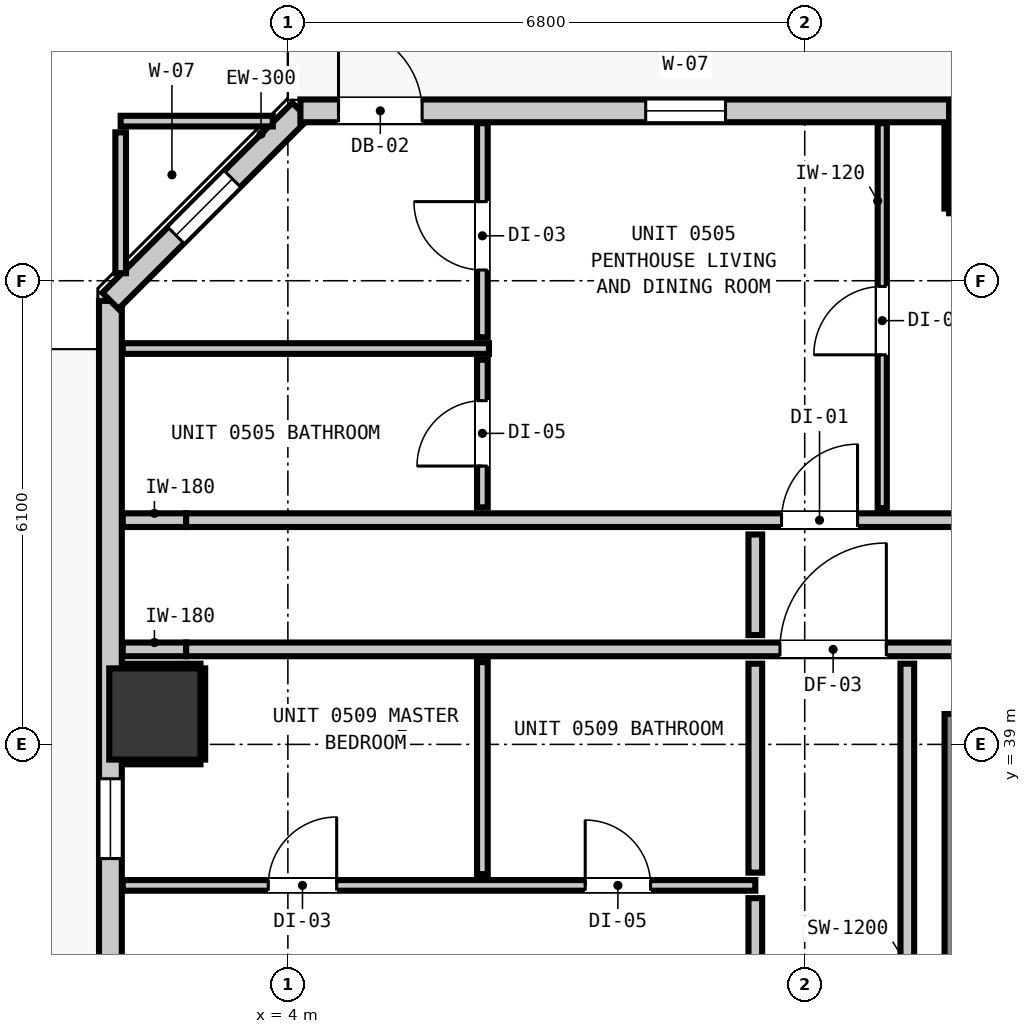
"""IFC4 building model, lengths in metres.
Left out: names, types, materials, properties, quantities, classifications, styles, units other than length and angle.
Written with IfcOpenShell. Run it as: python <this file> out.ifc"""

import sys

from ifc_helpers import new_model, si_unit, direction, frame, frame_2d, origin, origin_2d, place, context, subcontext, project, spatial, rectangle, extrude, element, fill, save


model = new_model("IFC4")
c1 = context("Model", 3, precision=1e-05, world=origin(), true_north=direction((0.0, 1.0)))
c2 = subcontext(c1, "Body", "Model", "MODEL_VIEW")
j1 = project(units=[si_unit("LENGTHUNIT", "METRE"), si_unit("PLANEANGLEUNIT", "RADIAN")], contexts=[c1])
p1 = place(None, origin())
s1 = spatial("IfcSite", under=j1, at=p1, CompositionType="ELEMENT")
p2 = place(p1, origin())
s2 = spatial("IfcBuilding", under=s1, at=p2, CompositionType="ELEMENT")
p3 = place(p2, frame((0.0, 0.0, 22.0)))
s3 = spatial("IfcBuildingStorey", under=s2, at=p3, CompositionType="ELEMENT", Elevation=22.0)
p4 = place(p3, frame((13.24, 31.205, 0.0), z_axis=(0.0, 0.0, 1.0), x_axis=(0.0, 1.0, 0.0)))
e1 = element("IfcWall", 1, at=p4, inside=s3, PredefinedType="SHEAR", context=c2, shape_type="SweptSolid", body=[
    extrude(rectangle(XDim=8.195, YDim=1.2, at=frame_2d((4.097, 0.0))), origin(), (0.0, 0.0, 1.0), 3.32),
])
p5 = place(p3, frame((13.4, 46.75, -0.2), z_axis=(0.0, 0.0, 1.0), x_axis=(1.0, 0.0, 0.0)))
e2 = element("IfcColumn", 2, at=p5, inside=s3, PredefinedType="COLUMN", context=c2, shape_type="SweptSolid", body=[
    extrude(rectangle(XDim=1.4, YDim=1.4, at=origin_2d()), origin(), (0.0, 0.0, 1.0), 3.52),
])
p6 = place(p3, frame((2.25, 39.4, -0.2), z_axis=(0.0, 0.0, 1.0), x_axis=(1.0, 0.0, 0.0)))
e3 = element("IfcColumn", 3, at=p6, inside=s3, PredefinedType="COLUMN", context=c2, shape_type="SweptSolid", body=[
    extrude(rectangle(XDim=1.2, YDim=1.2, at=origin_2d()), origin(), (0.0, 0.0, 1.0), 3.52),
])
p7 = place(p3, frame((1.665, 10.165, 0.0), z_axis=(0.0, 0.0, 1.0), x_axis=(0.0, 1.0, 0.0)))
e4 = element("IfcWall", 4, at=p7, inside=s3, PredefinedType="STANDARD", context=c2, shape_type="SweptSolid", body=[
    extrude(rectangle(XDim=34.67, YDim=0.3, at=frame_2d((17.335, 0.0))), origin(), (0.0, 0.0, 1.0), 3.06),
])
p8 = place(p7, frame((3.352, 0.0, 0.0)))
e5 = element("IfcOpeningElement", 5, at=p8, cuts=e4, PredefinedType="OPENING", context=c2, shape_type="SweptSolid", body=[
    extrude(rectangle(XDim=1.0, YDim=2.15, at=frame_2d((0.5, 1.075))), frame((0.0, 0.16, 0.0), z_axis=(0.0, -1.0, 0.0), x_axis=(1.0, 0.0, 0.0)), (0.0, 0.0, 1.0), 0.32),
])
p9 = place(p7, frame((14.748, 0.0, 0.85)))
e6 = element("IfcOpeningElement", 6, at=p9, cuts=e4, PredefinedType="OPENING", context=c2, shape_type="SweptSolid", body=[
    extrude(rectangle(XDim=1.05, YDim=1.65, at=frame_2d((0.525, 0.825))), frame((0.0, 0.16, 0.0), z_axis=(0.0, -1.0, 0.0), x_axis=(1.0, 0.0, 0.0)), (0.0, 0.0, 1.0), 0.32),
])
p10 = place(p7, frame((17.898, 0.0, 0.85)))
e7 = element("IfcOpeningElement", 7, at=p10, cuts=e4, PredefinedType="OPENING", context=c2, shape_type="SweptSolid", body=[
    extrude(rectangle(XDim=1.05, YDim=1.65, at=frame_2d((0.525, 0.825))), frame((0.0, 0.16, 0.0), z_axis=(0.0, -1.0, 0.0), x_axis=(1.0, 0.0, 0.0)), (0.0, 0.0, 1.0), 0.32),
])
p11 = place(p7, frame((24.282, 0.0, 0.85)))
e8 = element("IfcOpeningElement", 8, at=p11, cuts=e4, PredefinedType="OPENING", context=c2, shape_type="SweptSolid", body=[
    extrude(rectangle(XDim=1.05, YDim=1.65, at=frame_2d((0.525, 0.825))), frame((0.0, 0.16, 0.0), z_axis=(0.0, -1.0, 0.0), x_axis=(1.0, 0.0, 0.0)), (0.0, 0.0, 1.0), 0.32),
])
p12 = place(p7, frame((27.333, 0.0, 0.85)))
e9 = element("IfcOpeningElement", 9, at=p12, cuts=e4, PredefinedType="OPENING", context=c2, shape_type="SweptSolid", body=[
    extrude(rectangle(XDim=1.05, YDim=1.65, at=frame_2d((0.525, 0.825))), frame((0.0, 0.16, 0.0), z_axis=(0.0, -1.0, 0.0), x_axis=(1.0, 0.0, 0.0)), (0.0, 0.0, 1.0), 0.32),
])
p13 = place(p3, frame((1.665, 44.835, 0.0), z_axis=(0.0, 0.0, 1.0), x_axis=(0.707106781187, 0.707106781187, 0.0)))
e10 = element("IfcWall", 10, at=p13, inside=s3, PredefinedType="STANDARD", context=c2, shape_type="SweptSolid", body=[
    extrude(rectangle(XDim=3.536, YDim=0.3, at=frame_2d((1.768, 0.0))), origin(), (0.0, 0.0, 1.0), 3.06),
])
p14 = place(p13, frame((1.22, 0.0, 0.85)))
e11 = element("IfcOpeningElement", 11, at=p14, cuts=e10, PredefinedType="OPENING", context=c2, shape_type="SweptSolid", body=[
    extrude(rectangle(XDim=1.05, YDim=1.65, at=frame_2d((0.525, 0.825))), frame((0.0, 0.16, 0.0), z_axis=(0.0, -1.0, 0.0), x_axis=(1.0, 0.0, 0.0)), (0.0, 0.0, 1.0), 0.32),
])
p15 = place(p3, frame((4.165, 47.335, 0.0), z_axis=(0.0, 0.0, 1.0), x_axis=(1.0, 0.0, 0.0)))
e12 = element("IfcWall", 12, at=p15, inside=s3, PredefinedType="STANDARD", context=c2, shape_type="SweptSolid", body=[
    extrude(rectangle(XDim=37.47, YDim=0.3, at=frame_2d((18.735, 0.0))), origin(), (0.0, 0.0, 1.0), 3.06),
])
p16 = place(p15, frame((0.501, 0.0, 0.0)))
e13 = element("IfcOpeningElement", 13, at=p16, cuts=e12, PredefinedType="OPENING", context=c2, shape_type="SweptSolid", body=[
    extrude(rectangle(XDim=1.1, YDim=2.15, at=frame_2d((0.55, 1.075))), frame((0.0, 0.16, 0.0), z_axis=(0.0, -1.0, 0.0), x_axis=(1.0, 0.0, 0.0)), (0.0, 0.0, 1.0), 0.32),
])
p17 = place(p15, frame((4.543, 0.0, 0.85)))
e14 = element("IfcOpeningElement", 14, at=p17, cuts=e12, PredefinedType="OPENING", context=c2, shape_type="SweptSolid", body=[
    extrude(rectangle(XDim=1.05, YDim=1.65, at=frame_2d((0.525, 0.825))), frame((0.0, 0.16, 0.0), z_axis=(0.0, -1.0, 0.0), x_axis=(1.0, 0.0, 0.0)), (0.0, 0.0, 1.0), 0.32),
])
p18 = place(p15, frame((13.746, 0.0, 0.85)))
e15 = element("IfcOpeningElement", 15, at=p18, cuts=e12, PredefinedType="OPENING", context=c2, shape_type="SweptSolid", body=[
    extrude(rectangle(XDim=1.05, YDim=1.65, at=frame_2d((0.525, 0.825))), frame((0.0, 0.16, 0.0), z_axis=(0.0, -1.0, 0.0), x_axis=(1.0, 0.0, 0.0)), (0.0, 0.0, 1.0), 0.32),
])
p19 = place(p15, frame((29.575, 0.0, 0.85)))
e16 = element("IfcOpeningElement", 16, at=p19, cuts=e12, PredefinedType="OPENING", context=c2, shape_type="SweptSolid", body=[
    extrude(rectangle(XDim=1.05, YDim=1.65, at=frame_2d((0.525, 0.825))), frame((0.0, 0.16, 0.0), z_axis=(0.0, -1.0, 0.0), x_axis=(1.0, 0.0, 0.0)), (0.0, 0.0, 1.0), 0.32),
])
p20 = place(p15, frame((26.524, 0.0, 0.85)))
e17 = element("IfcOpeningElement", 17, at=p20, cuts=e12, PredefinedType="OPENING", context=c2, shape_type="SweptSolid", body=[
    extrude(rectangle(XDim=1.05, YDim=1.65, at=frame_2d((0.525, 0.825))), frame((0.0, 0.16, 0.0), z_axis=(0.0, -1.0, 0.0), x_axis=(1.0, 0.0, 0.0)), (0.0, 0.0, 1.0), 0.32),
])
p21 = place(p3, frame((1.827, 40.25, 0.0), z_axis=(0.0, 0.0, 1.0), x_axis=(1.0, 0.0, 0.0)))
e18 = element("IfcWall", 18, at=p21, inside=s3, PredefinedType="PARTITIONING", context=c2, shape_type="SweptSolid", body=[
    extrude(rectangle(XDim=0.834, YDim=0.18, at=frame_2d((0.417, 0.0))), origin(), (0.0, 0.0, 1.0), 3.06),
])
p22 = place(p3, frame((2.661, 40.25, 0.0), z_axis=(0.0, 0.0, 1.0), x_axis=(1.0, 0.0, 0.0)))
e19 = element("IfcWall", 19, at=p22, inside=s3, PredefinedType="PARTITIONING", context=c2, shape_type="SweptSolid", body=[
    extrude(rectangle(XDim=10.328, YDim=0.18, at=frame_2d((5.164, 0.0))), origin(), (0.0, 0.0, 1.0), 2.445),
])
p23 = place(p22, frame((7.813, 0.0, 0.0)))
e20 = element("IfcOpeningElement", 20, at=p23, cuts=e19, PredefinedType="OPENING", context=c2, shape_type="SweptSolid", body=[
    extrude(rectangle(XDim=1.4, YDim=2.15, at=frame_2d((0.7, 1.075))), frame((0.0, 0.1, 0.0), z_axis=(0.0, -1.0, 0.0), x_axis=(1.0, 0.0, 0.0)), (0.0, 0.0, 1.0), 0.2),
])
p24 = place(p3, frame((1.827, 41.95, 0.0), z_axis=(0.0, 0.0, 1.0), x_axis=(1.0, 0.0, 0.0)))
e21 = element("IfcWall", 21, at=p24, inside=s3, PredefinedType="PARTITIONING", context=c2, shape_type="SweptSolid", body=[
    extrude(rectangle(XDim=0.834, YDim=0.18, at=frame_2d((0.417, 0.0))), origin(), (0.0, 0.0, 1.0), 3.06),
])
p25 = place(p3, frame((2.661, 41.95, 0.0), z_axis=(0.0, 0.0, 1.0), x_axis=(1.0, 0.0, 0.0)))
e22 = element("IfcWall", 22, at=p25, inside=s3, PredefinedType="PARTITIONING", context=c2, shape_type="SweptSolid", body=[
    extrude(rectangle(XDim=10.328, YDim=0.18, at=frame_2d((5.164, 0.0))), origin(), (0.0, 0.0, 1.0), 2.445),
])
p26 = place(p25, frame((7.834, 0.0, 0.0)))
e23 = element("IfcOpeningElement", 23, at=p26, cuts=e22, PredefinedType="OPENING", context=c2, shape_type="SweptSolid", body=[
    extrude(rectangle(XDim=1.0, YDim=2.15, at=frame_2d((0.5, 1.075))), frame((0.0, 0.1, 0.0), z_axis=(0.0, -1.0, 0.0), x_axis=(1.0, 0.0, 0.0)), (0.0, 0.0, 1.0), 0.2),
])
p27 = place(p3, frame((1.827, 37.145, 0.0), z_axis=(0.0, 0.0, 1.0), x_axis=(1.0, 0.0, 0.0)))
e24 = element("IfcWall", 24, at=p27, inside=s3, PredefinedType="PARTITIONING", context=c2, shape_type="SweptSolid", body=[
    extrude(rectangle(XDim=8.323, YDim=0.14, at=frame_2d((4.162, 0.0))), origin(), (0.0, 0.0, 1.0), 3.06),
])
p28 = place(p27, frame((6.085, 0.0, 0.0)))
e25 = element("IfcOpeningElement", 25, at=p28, cuts=e24, PredefinedType="OPENING", context=c2, shape_type="SweptSolid", body=[
    extrude(rectangle(XDim=0.86, YDim=2.02, at=frame_2d((0.43, 1.01))), frame((0.0, 0.08, 0.0), z_axis=(0.0, -1.0, 0.0), x_axis=(1.0, 0.0, 0.0)), (0.0, 0.0, 1.0), 0.16),
])
p29 = place(p27, frame((1.915, 0.0, 0.0)))
e26 = element("IfcOpeningElement", 26, at=p29, cuts=e24, PredefinedType="OPENING", context=c2, shape_type="SweptSolid", body=[
    extrude(rectangle(XDim=0.9, YDim=2.1, at=frame_2d((0.45, 1.05))), frame((0.0, 0.08, 0.0), z_axis=(0.0, -1.0, 0.0), x_axis=(1.0, 0.0, 0.0)), (0.0, 0.0, 1.0), 0.16),
])
p30 = place(p3, frame((1.827, 44.208, 0.0), z_axis=(0.0, 0.0, 1.0), x_axis=(1.0, 0.0, 0.0)))
e27 = element("IfcWall", 27, at=p30, inside=s3, PredefinedType="PARTITIONING", context=c2, shape_type="SweptSolid", body=[
    extrude(rectangle(XDim=4.819, YDim=0.14, at=frame_2d((2.41, 0.0))), origin(), (0.0, 0.0, 1.0), 3.06),
])
p31 = place(p3, frame((1.8, 47.2, 0.0), z_axis=(0.0, 0.0, 1.0), x_axis=(1.0, 0.0, 0.0)))
e28 = element("IfcWall", 28, at=p31, inside=s3, PredefinedType="PARTITIONING", context=c2, shape_type="SweptSolid", body=[
    extrude(rectangle(XDim=2.001, YDim=0.14, at=frame_2d((1.0, 0.0))), origin(), (0.0, 0.0, 1.0), 3.06),
])
p32 = place(p3, frame((10.15, 33.118, 0.0), z_axis=(0.0, 0.0, 1.0), x_axis=(0.0, 1.0, 0.0)))
e29 = element("IfcWall", 29, at=p32, inside=s3, PredefinedType="PARTITIONING", context=c2, shape_type="SweptSolid", body=[
    extrude(rectangle(XDim=3.859, YDim=0.18, at=frame_2d((1.93, 0.0))), origin(), (0.0, 0.0, 1.0), 3.06),
])
p33 = place(p32, frame((1.353, 0.0, 0.0)))
e30 = element("IfcOpeningElement", 30, at=p33, cuts=e29, PredefinedType="OPENING", context=c2, shape_type="SweptSolid", body=[
    extrude(rectangle(XDim=1.0, YDim=2.15, at=frame_2d((0.5, 1.075))), frame((0.0, 0.1, 0.0), z_axis=(0.0, -1.0, 0.0), x_axis=(1.0, 0.0, 0.0)), (0.0, 0.0, 1.0), 0.2),
])
p34 = place(p3, frame((10.15, 37.313, 0.0), z_axis=(0.0, 0.0, 1.0), x_axis=(0.0, 1.0, 0.0)))
e31 = element("IfcWall", 31, at=p34, inside=s3, PredefinedType="PARTITIONING", context=c2, shape_type="SweptSolid", body=[
    extrude(rectangle(XDim=2.749, YDim=0.18, at=frame_2d((1.375, 0.0))), origin(), (0.0, 0.0, 1.0), 3.06),
])
p35 = place(p3, frame((10.15, 40.438, 0.0), z_axis=(0.0, 0.0, 1.0), x_axis=(0.0, 1.0, 0.0)))
e32 = element("IfcWall", 32, at=p35, inside=s3, PredefinedType="PARTITIONING", context=c2, shape_type="SweptSolid", body=[
    extrude(rectangle(XDim=1.324, YDim=0.18, at=frame_2d((0.662, 0.0))), origin(), (0.0, 0.0, 1.0), 3.06),
])
p36 = place(p3, frame((12.15, 21.368, 0.0), z_axis=(0.0, 0.0, 1.0), x_axis=(0.0, 1.0, 0.0)))
e33 = element("IfcWall", 33, at=p36, inside=s3, PredefinedType="PARTITIONING", context=c2, shape_type="SweptSolid", body=[
    extrude(rectangle(XDim=18.694, YDim=0.18, at=frame_2d((9.347, 0.0))), origin(), (0.0, 0.0, 1.0), 3.06),
])
p37 = place(p3, frame((1.8, 45.199, 0.0), z_axis=(0.0, 0.0, 1.0), x_axis=(0.0, 1.0, 0.0)))
e34 = element("IfcWall", 34, at=p37, inside=s3, PredefinedType="PARTITIONING", context=c2, shape_type="SweptSolid", body=[
    extrude(rectangle(XDim=1.853, YDim=0.14, at=frame_2d((0.927, 0.0))), origin(), (0.0, 0.0, 1.0), 3.06),
])
p38 = place(p3, frame((6.559, 37.293, 0.0), z_axis=(0.0, 0.0, 1.0), x_axis=(0.0, 1.0, 0.0)))
e35 = element("IfcWall", 35, at=p38, inside=s3, PredefinedType="PARTITIONING", context=c2, shape_type="SweptSolid", body=[
    extrude(rectangle(XDim=2.789, YDim=0.14, at=frame_2d((1.395, 0.0))), origin(), (0.0, 0.0, 1.0), 3.06),
])
p39 = place(p3, frame((6.559, 42.118, 0.0), z_axis=(0.0, 0.0, 1.0), x_axis=(0.0, 1.0, 0.0)))
e36 = element("IfcWall", 36, at=p39, inside=s3, PredefinedType="PARTITIONING", context=c2, shape_type="SweptSolid", body=[
    extrude(rectangle(XDim=1.942, YDim=0.14, at=frame_2d((0.971, 0.0))), origin(), (0.0, 0.0, 1.0), 3.06),
])
p40 = place(p39, frame((0.544, 0.0, 0.0)))
e37 = element("IfcOpeningElement", 37, at=p40, cuts=e36, PredefinedType="OPENING", context=c2, shape_type="SweptSolid", body=[
    extrude(rectangle(XDim=0.86, YDim=2.02, at=frame_2d((0.43, 1.01))), frame((0.0, 0.08, 0.0), z_axis=(0.0, -1.0, 0.0), x_axis=(1.0, 0.0, 0.0)), (0.0, 0.0, 1.0), 0.16),
])
p41 = place(p3, frame((6.559, 44.356, 0.0), z_axis=(0.0, 0.0, 1.0), x_axis=(0.0, 1.0, 0.0)))
e38 = element("IfcWall", 38, at=p41, inside=s3, PredefinedType="PARTITIONING", context=c2, shape_type="SweptSolid", body=[
    extrude(rectangle(XDim=2.817, YDim=0.14, at=frame_2d((1.409, 0.0))), origin(), (0.0, 0.0, 1.0), 3.06),
])
p42 = place(p41, frame((0.885, 0.0, 0.0)))
e39 = element("IfcOpeningElement", 39, at=p42, cuts=e38, PredefinedType="OPENING", context=c2, shape_type="SweptSolid", body=[
    extrude(rectangle(XDim=0.9, YDim=2.1, at=frame_2d((0.45, 1.05))), frame((0.0, 0.08, 0.0), z_axis=(0.0, -1.0, 0.0), x_axis=(1.0, 0.0, 0.0)), (0.0, 0.0, 1.0), 0.16),
])
p43 = place(p3, frame((11.82, 42.108, 0.0), z_axis=(0.0, 0.0, 1.0), x_axis=(0.0, 1.0, 0.0)))
e40 = element("IfcWall", 40, at=p43, inside=s3, PredefinedType="PARTITIONING", context=c2, shape_type="SweptSolid", body=[
    extrude(rectangle(XDim=5.065, YDim=0.12, at=frame_2d((2.533, 0.0))), origin(), (0.0, 0.0, 1.0), 3.06),
])
p44 = place(p43, frame((2.017, 0.0, 0.0)))
e41 = element("IfcOpeningElement", 41, at=p44, cuts=e40, PredefinedType="OPENING", context=c2, shape_type="SweptSolid", body=[
    extrude(rectangle(XDim=0.9, YDim=2.1, at=frame_2d((0.45, 1.05))), frame((0.0, 0.07, 0.0), z_axis=(0.0, -1.0, 0.0), x_axis=(1.0, 0.0, 0.0)), (0.0, 0.0, 1.0), 0.14),
])
p45 = place(p3, frame((12.7, 46.018, 0.0), z_axis=(0.0, 0.0, 1.0), x_axis=(1.0, 0.0, 0.0)))
e42 = element("IfcWall", 42, at=p45, inside=s3, PredefinedType="PARTITIONING", context=c2, shape_type="SweptSolid", body=[
    extrude(rectangle(XDim=1.4, YDim=0.06, at=frame_2d((0.7, 0.0))), origin(), (0.0, 0.0, 1.0), 1.45),
])
p46 = place(p3, frame((12.668, 46.05, 0.0), z_axis=(0.0, 0.0, 1.0), x_axis=(0.0, 1.0, 0.0)))
e43 = element("IfcWall", 43, at=p46, inside=s3, PredefinedType="PARTITIONING", context=c2, shape_type="SweptSolid", body=[
    extrude(rectangle(XDim=1.12, YDim=0.06, at=frame_2d((0.56, 0.0))), origin(), (0.0, 0.0, 1.0), 1.45),
])
for number, where, z_axis, x_axis in (
    (44, (1.83, 38.768, 0.0), (0.0, 0.0, 1.0), (1.0, 0.0, 0.0)),
    (45, (1.83, 40.032, 0.0), (0.0, 0.0, 1.0), (1.0, 0.0, 0.0)),
):
    element("IfcWall", number, at=place(p3, frame(where, z_axis=z_axis, x_axis=x_axis)), inside=s3, PredefinedType="PARTITIONING", context=c2, shape_type="SweptSolid", body=[
        extrude(rectangle(XDim=1.02, YDim=0.06, at=frame_2d((0.51, 0.0))), origin(), (0.0, 0.0, 1.0), 1.45),
    ])
p47 = place(p3, frame((2.882, 38.8, 0.0), z_axis=(0.0, 0.0, 1.0), x_axis=(0.0, 1.0, 0.0)))
e46 = element("IfcWall", 46, at=p47, inside=s3, PredefinedType="PARTITIONING", context=c2, shape_type="SweptSolid", body=[
    extrude(rectangle(XDim=1.2, YDim=0.06, at=frame_2d((0.6, 0.0))), origin(), (0.0, 0.0, 1.0), 1.45),
])
p48 = place(p16, origin())
e47 = element("IfcDoor", 47, at=p48, inside=s3, OperationType="SINGLE_SWING_LEFT", PredefinedType="DOOR", context=c2, shape_type="SweptSolid", body=[
    extrude(rectangle(XDim=1.1, YDim=2.15, at=frame_2d((0.55, 1.075))), frame((0.0, 0.025, 0.0), z_axis=(0.0, -1.0, 0.0), x_axis=(1.0, 0.0, 0.0)), (0.0, 0.0, 1.0), 0.05),
])
fill(e13, e47)
p49 = place(p12, origin())
e48 = element("IfcWindow", 48, at=p49, inside=s3, PartitioningType="SINGLE_PANEL", PredefinedType="WINDOW", context=c2, shape_type="SweptSolid", body=[
    extrude(rectangle(XDim=1.05, YDim=1.65, at=frame_2d((0.525, 0.825))), frame((0.0, 0.03, 0.0), z_axis=(0.0, -1.0, 0.0), x_axis=(1.0, 0.0, 0.0)), (0.0, 0.0, 1.0), 0.06),
])
fill(e9, e48)
p50 = place(p17, origin())
e49 = element("IfcWindow", 49, at=p50, inside=s3, PartitioningType="SINGLE_PANEL", PredefinedType="WINDOW", context=c2, shape_type="SweptSolid", body=[
    extrude(rectangle(XDim=1.05, YDim=1.65, at=frame_2d((0.525, 0.825))), frame((0.0, 0.03, 0.0), z_axis=(0.0, -1.0, 0.0), x_axis=(1.0, 0.0, 0.0)), (0.0, 0.0, 1.0), 0.06),
])
fill(e14, e49)
p51 = place(p14, origin())
e50 = element("IfcWindow", 50, at=p51, inside=s3, PartitioningType="SINGLE_PANEL", PredefinedType="WINDOW", context=c2, shape_type="SweptSolid", body=[
    extrude(rectangle(XDim=1.05, YDim=1.65, at=frame_2d((0.525, 0.825))), frame((0.0, 0.03, 0.0), z_axis=(0.0, -1.0, 0.0), x_axis=(1.0, 0.0, 0.0)), (0.0, 0.0, 1.0), 0.06),
])
fill(e11, e50)
p52 = place(p23, origin())
e51 = element("IfcDoor", 51, at=p52, inside=s3, OperationType="SINGLE_SWING_RIGHT", PredefinedType="DOOR", context=c2, shape_type="SweptSolid", body=[
    extrude(rectangle(XDim=1.4, YDim=2.15, at=frame_2d((0.7, 1.075))), frame((0.0, 0.025, 0.0), z_axis=(0.0, -1.0, 0.0), x_axis=(1.0, 0.0, 0.0)), (0.0, 0.0, 1.0), 0.05),
])
fill(e20, e51)
p53 = place(p26, origin())
e52 = element("IfcDoor", 52, at=p53, inside=s3, OperationType="SINGLE_SWING_RIGHT", PredefinedType="DOOR", context=c2, shape_type="SweptSolid", body=[
    extrude(rectangle(XDim=1.0, YDim=2.15, at=frame_2d((0.5, 1.075))), frame((0.0, 0.025, 0.0), z_axis=(0.0, -1.0, 0.0), x_axis=(1.0, 0.0, 0.0)), (0.0, 0.0, 1.0), 0.05),
])
fill(e23, e52)
p54 = place(p40, origin())
e53 = element("IfcDoor", 53, at=p54, inside=s3, OperationType="SINGLE_SWING_LEFT", PredefinedType="DOOR", context=c2, shape_type="SweptSolid", body=[
    extrude(rectangle(XDim=0.86, YDim=2.02, at=frame_2d((0.43, 1.01))), frame((0.0, 0.025, 0.0), z_axis=(0.0, -1.0, 0.0), x_axis=(1.0, 0.0, 0.0)), (0.0, 0.0, 1.0), 0.05),
])
fill(e37, e53)
p55 = place(p42, origin())
e54 = element("IfcDoor", 54, at=p55, inside=s3, OperationType="SINGLE_SWING_RIGHT", PredefinedType="DOOR", context=c2, shape_type="SweptSolid", body=[
    extrude(rectangle(XDim=0.9, YDim=2.1, at=frame_2d((0.45, 1.05))), frame((0.0, 0.025, 0.0), z_axis=(0.0, -1.0, 0.0), x_axis=(1.0, 0.0, 0.0)), (0.0, 0.0, 1.0), 0.05),
])
fill(e39, e54)
p56 = place(p44, origin())
e55 = element("IfcDoor", 55, at=p56, inside=s3, OperationType="SINGLE_SWING_LEFT", PredefinedType="DOOR", context=c2, shape_type="SweptSolid", body=[
    extrude(rectangle(XDim=0.9, YDim=2.1, at=frame_2d((0.45, 1.05))), frame((0.0, 0.025, 0.0), z_axis=(0.0, -1.0, 0.0), x_axis=(1.0, 0.0, 0.0)), (0.0, 0.0, 1.0), 0.05),
])
fill(e41, e55)
p57 = place(p28, origin())
e56 = element("IfcDoor", 56, at=p57, inside=s3, OperationType="SINGLE_SWING_LEFT", PredefinedType="DOOR", context=c2, shape_type="SweptSolid", body=[
    extrude(rectangle(XDim=0.86, YDim=2.02, at=frame_2d((0.43, 1.01))), frame((0.0, 0.025, 0.0), z_axis=(0.0, -1.0, 0.0), x_axis=(1.0, 0.0, 0.0)), (0.0, 0.0, 1.0), 0.05),
])
fill(e25, e56)
p58 = place(p29, origin())
e57 = element("IfcDoor", 57, at=p58, inside=s3, OperationType="SINGLE_SWING_RIGHT", PredefinedType="DOOR", context=c2, shape_type="SweptSolid", body=[
    extrude(rectangle(XDim=0.9, YDim=2.1, at=frame_2d((0.45, 1.05))), frame((0.0, 0.025, 0.0), z_axis=(0.0, -1.0, 0.0), x_axis=(1.0, 0.0, 0.0)), (0.0, 0.0, 1.0), 0.05),
])
fill(e26, e57)
save(model, sys.argv[1])
